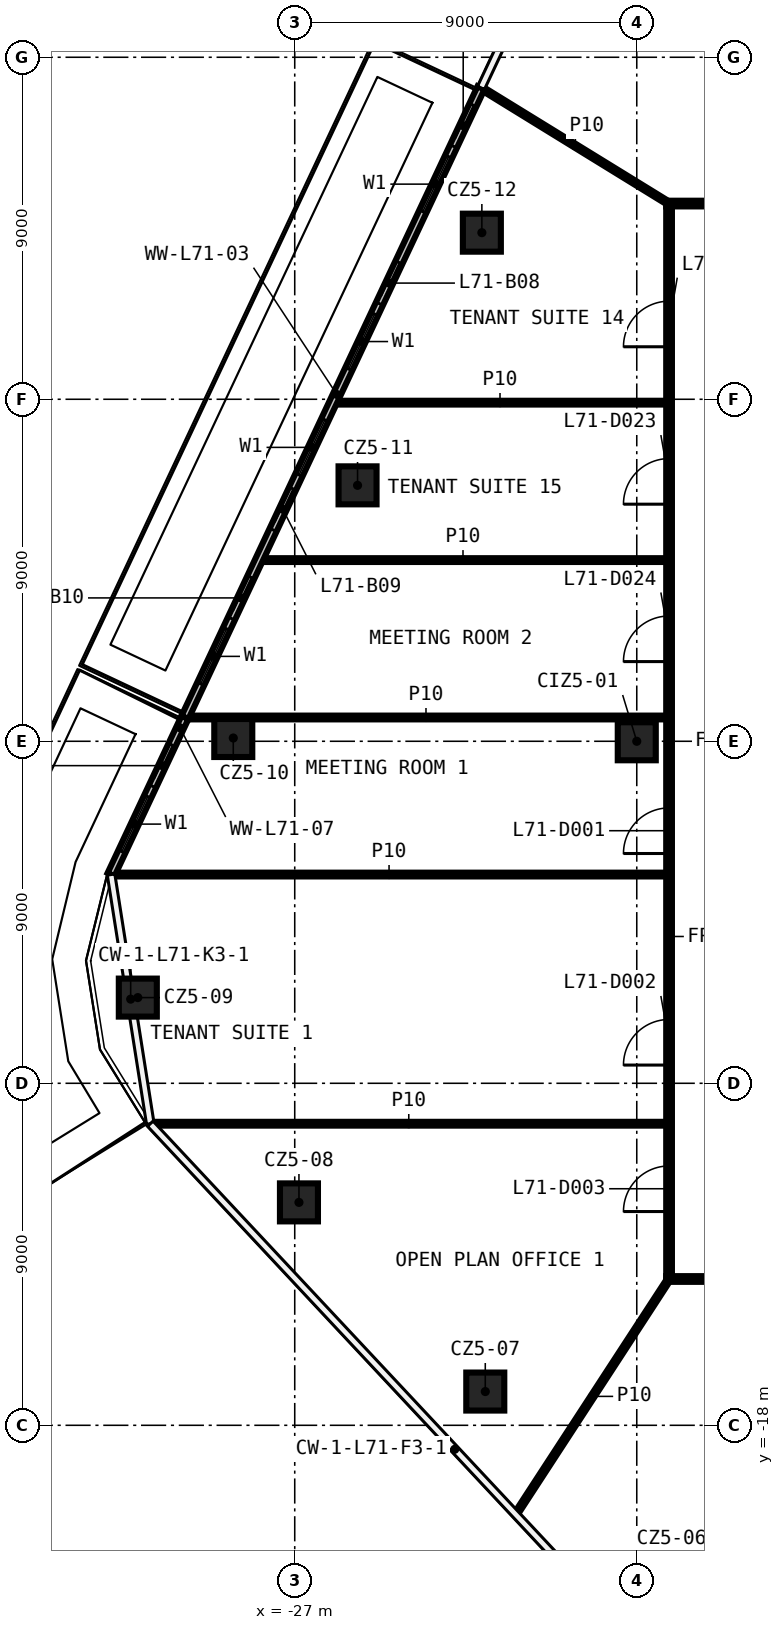
"""IFC4 building model, lengths in metres.
Left out: names, types, materials, properties, quantities, classifications, styles, units other than length and angle.
Written with IfcOpenShell. Run it as: python <this file> out.ifc"""

import sys

from ifc_helpers import new_model, si_unit, direction, frame, frame_2d, origin, origin_2d, place, context, subcontext, project, spatial, rectangle, extrude, element, fill, save


model = new_model("IFC4")
c1 = context("Model", 3, precision=1e-05, world=origin(), true_north=direction((0.0, 1.0)))
c2 = subcontext(c1, "Body", "Model", "MODEL_VIEW")
j1 = project(units=[si_unit("LENGTHUNIT", "METRE"), si_unit("PLANEANGLEUNIT", "RADIAN")], contexts=[c1])
p1 = place(None, origin())
s1 = spatial("IfcSite", under=j1, at=p1, CompositionType="ELEMENT")
p2 = place(p1, origin())
s2 = spatial("IfcBuilding", under=s1, at=p2, CompositionType="ELEMENT")
p3 = place(p2, frame((0.0, 0.0, 332.0)))
s3 = spatial("IfcBuildingStorey", under=s2, at=p3, CompositionType="ELEMENT", Elevation=332.0)
for number, where, z_axis, x_axis in (
    (1, (-21.986, -17.112, 0.0), (0.0, 0.0, 1.0), (1.0, 0.0, 0.0)),
    (2, (-26.889, -12.134, 0.0), (0.0, 0.0, 1.0), (1.0, 0.0, 0.0)),
    (3, (-31.129, -6.745, 0.0), (0.0, 0.0, 1.0), (1.0, 0.0, 0.0)),
    (4, (-28.617, 0.086, 0.0), (0.0, 0.0, 1.0), (1.0, 0.0, 0.0)),
    (5, (-25.347, 6.735, 0.0), (0.0, 0.0, 1.0), (1.0, 0.0, 0.0)),
    (6, (-22.076, 13.384, 0.0), (0.0, 0.0, 1.0), (1.0, 0.0, 0.0)),
    (7, (-18.0, 0.0, 0.0), (0.0, 0.0, 1.0), (1.0, 0.0, 0.0)),
):
    element("IfcColumn", number, at=place(p3, frame(where, z_axis=z_axis, x_axis=x_axis)), inside=s3, PredefinedType="COLUMN", context=c2, shape_type="SweptSolid", body=[
        extrude(rectangle(XDim=1.0, YDim=1.0, at=origin_2d()), origin(), (0.0, 0.0, 1.0), 3.82),
    ])
p4 = place(p3, frame((17.225, -14.15, 0.0), z_axis=(0.0, 0.0, 1.0), x_axis=(-1.0, 0.0, 0.0)))
e8 = element("IfcWall", 8, at=p4, inside=s3, PredefinedType="PARTITIONING", context=c2, shape_type="SweptSolid", body=[
    extrude(rectangle(XDim=34.45, YDim=0.15, at=frame_2d((17.225, 0.0))), origin(), (0.0, 0.0, 1.0), 3.82),
])
p5 = place(p4, frame((24.639, 0.0, 0.0)))
e9 = element("IfcOpeningElement", 9, at=p5, cuts=e8, PredefinedType="OPENING", context=c2, shape_type="SweptSolid", body=[
    extrude(rectangle(XDim=1.2, YDim=2.1, at=frame_2d((0.6, 1.05))), frame((0.0, 0.085, 0.0), z_axis=(0.0, -1.0, 0.0), x_axis=(1.0, 0.0, 0.0)), (0.0, 0.0, 1.0), 0.17),
])
p6 = place(p4, frame((20.005, 0.0, 0.0)))
e10 = element("IfcOpeningElement", 10, at=p6, cuts=e8, PredefinedType="OPENING", context=c2, shape_type="SweptSolid", body=[
    extrude(rectangle(XDim=1.2, YDim=2.1, at=frame_2d((0.6, 1.05))), frame((0.0, 0.085, 0.0), z_axis=(0.0, -1.0, 0.0), x_axis=(1.0, 0.0, 0.0)), (0.0, 0.0, 1.0), 0.17),
])
p7 = place(p4, frame((15.367, 0.0, 0.0)))
e11 = element("IfcOpeningElement", 11, at=p7, cuts=e8, PredefinedType="OPENING", context=c2, shape_type="SweptSolid", body=[
    extrude(rectangle(XDim=1.2, YDim=2.1, at=frame_2d((0.6, 1.05))), frame((0.0, 0.085, 0.0), z_axis=(0.0, -1.0, 0.0), x_axis=(1.0, 0.0, 0.0)), (0.0, 0.0, 1.0), 0.17),
])
p8 = place(p4, frame((10.73, 0.0, 0.0)))
e12 = element("IfcOpeningElement", 12, at=p8, cuts=e8, PredefinedType="OPENING", context=c2, shape_type="SweptSolid", body=[
    extrude(rectangle(XDim=1.2, YDim=2.1, at=frame_2d((0.6, 1.05))), frame((0.0, 0.085, 0.0), z_axis=(0.0, -1.0, 0.0), x_axis=(1.0, 0.0, 0.0)), (0.0, 0.0, 1.0), 0.17),
])
p9 = place(p4, frame((6.097, 0.0, 0.0)))
e13 = element("IfcOpeningElement", 13, at=p9, cuts=e8, PredefinedType="OPENING", context=c2, shape_type="SweptSolid", body=[
    extrude(rectangle(XDim=1.2, YDim=2.1, at=frame_2d((0.6, 1.05))), frame((0.0, 0.085, 0.0), z_axis=(0.0, -1.0, 0.0), x_axis=(1.0, 0.0, 0.0)), (0.0, 0.0, 1.0), 0.17),
])
p10 = place(p4, frame((1.83, 0.0, 0.0)))
e14 = element("IfcOpeningElement", 14, at=p10, cuts=e8, PredefinedType="OPENING", context=c2, shape_type="SweptSolid", body=[
    extrude(rectangle(XDim=1.2, YDim=2.1, at=frame_2d((0.6, 1.05))), frame((0.0, 0.085, 0.0), z_axis=(0.0, -1.0, 0.0), x_axis=(1.0, 0.0, 0.0)), (0.0, 0.0, 1.0), 0.17),
])
p11 = place(p3, frame((-30.773, -10.064, 0.0), z_axis=(0.0, 0.0, 1.0), x_axis=(1.0, 0.0, 0.0)))
e15 = element("IfcWall", 15, at=p11, inside=s3, PredefinedType="PARTITIONING", context=c2, shape_type="SweptSolid", body=[
    extrude(rectangle(XDim=13.548, YDim=0.1, at=frame_2d((6.774, 0.0))), origin(), (0.0, 0.0, 1.0), 3.82),
])
p12 = place(p3, frame((-31.811, -3.507, 0.0), z_axis=(0.0, 0.0, 1.0), x_axis=(1.0, 0.0, 0.0)))
e16 = element("IfcWall", 16, at=p12, inside=s3, PredefinedType="PARTITIONING", context=c2, shape_type="SweptSolid", body=[
    extrude(rectangle(XDim=14.586, YDim=0.1, at=frame_2d((7.293, 0.0))), origin(), (0.0, 0.0, 1.0), 3.82),
])
p13 = place(p3, frame((-29.867, 0.626, 0.0), z_axis=(0.0, 0.0, 1.0), x_axis=(1.0, 0.0, 0.0)))
e17 = element("IfcWall", 17, at=p13, inside=s3, PredefinedType="PARTITIONING", context=c2, shape_type="SweptSolid", body=[
    extrude(rectangle(XDim=12.642, YDim=0.1, at=frame_2d((6.321, 0.0))), origin(), (0.0, 0.0, 1.0), 3.82),
])
p14 = place(p3, frame((-27.92, 4.768, 0.0), z_axis=(0.0, 0.0, 1.0), x_axis=(1.0, 0.0, 0.0)))
e18 = element("IfcWall", 18, at=p14, inside=s3, PredefinedType="PARTITIONING", context=c2, shape_type="SweptSolid", body=[
    extrude(rectangle(XDim=10.695, YDim=0.1, at=frame_2d((5.347, 0.0))), origin(), (0.0, 0.0, 1.0), 3.82),
])
p15 = place(p3, frame((-25.972, 8.911, 0.0), z_axis=(0.0, 0.0, 1.0), x_axis=(1.0, 0.0, 0.0)))
e19 = element("IfcWall", 19, at=p15, inside=s3, PredefinedType="PARTITIONING", context=c2, shape_type="SweptSolid", body=[
    extrude(rectangle(XDim=8.747, YDim=0.1, at=frame_2d((4.374, 0.0))), origin(), (0.0, 0.0, 1.0), 3.82),
])
p16 = place(p3, frame((-17.225, 14.15, 0.0), z_axis=(0.0, 0.0, 1.0), x_axis=(1.0, 0.0, 0.0)))
e20 = element("IfcWall", 20, at=p16, inside=s3, PredefinedType="PARTITIONING", context=c2, shape_type="SweptSolid", body=[
    extrude(rectangle(XDim=34.45, YDim=0.15, at=frame_2d((17.225, 0.0))), origin(), (0.0, 0.0, 1.0), 3.82),
])
p17 = place(p16, frame((24.708, 0.0, 0.0)))
e21 = element("IfcOpeningElement", 21, at=p17, cuts=e20, PredefinedType="OPENING", context=c2, shape_type="SweptSolid", body=[
    extrude(rectangle(XDim=1.2, YDim=2.1, at=frame_2d((0.6, 1.05))), frame((0.0, 0.085, 0.0), z_axis=(0.0, -1.0, 0.0), x_axis=(1.0, 0.0, 0.0)), (0.0, 0.0, 1.0), 0.17),
])
p18 = place(p16, frame((20.038, 0.0, 0.0)))
e22 = element("IfcOpeningElement", 22, at=p18, cuts=e20, PredefinedType="OPENING", context=c2, shape_type="SweptSolid", body=[
    extrude(rectangle(XDim=1.2, YDim=2.1, at=frame_2d((0.6, 1.05))), frame((0.0, 0.085, 0.0), z_axis=(0.0, -1.0, 0.0), x_axis=(1.0, 0.0, 0.0)), (0.0, 0.0, 1.0), 0.17),
])
p19 = place(p16, frame((15.367, 0.0, 0.0)))
e23 = element("IfcOpeningElement", 23, at=p19, cuts=e20, PredefinedType="OPENING", context=c2, shape_type="SweptSolid", body=[
    extrude(rectangle(XDim=1.2, YDim=2.1, at=frame_2d((0.6, 1.05))), frame((0.0, 0.085, 0.0), z_axis=(0.0, -1.0, 0.0), x_axis=(1.0, 0.0, 0.0)), (0.0, 0.0, 1.0), 0.17),
])
p20 = place(p16, frame((10.695, 0.0, 0.0)))
e24 = element("IfcOpeningElement", 24, at=p20, cuts=e20, PredefinedType="OPENING", context=c2, shape_type="SweptSolid", body=[
    extrude(rectangle(XDim=1.2, YDim=2.1, at=frame_2d((0.6, 1.05))), frame((0.0, 0.085, 0.0), z_axis=(0.0, -1.0, 0.0), x_axis=(1.0, 0.0, 0.0)), (0.0, 0.0, 1.0), 0.17),
])
p21 = place(p16, frame((6.025, 0.0, 0.0)))
e25 = element("IfcOpeningElement", 25, at=p21, cuts=e20, PredefinedType="OPENING", context=c2, shape_type="SweptSolid", body=[
    extrude(rectangle(XDim=1.2, YDim=2.1, at=frame_2d((0.6, 1.05))), frame((0.0, 0.085, 0.0), z_axis=(0.0, -1.0, 0.0), x_axis=(1.0, 0.0, 0.0)), (0.0, 0.0, 1.0), 0.17),
])
p22 = place(p16, frame((1.698, 0.0, 0.0)))
e26 = element("IfcOpeningElement", 26, at=p22, cuts=e20, PredefinedType="OPENING", context=c2, shape_type="SweptSolid", body=[
    extrude(rectangle(XDim=1.2, YDim=2.1, at=frame_2d((0.6, 1.05))), frame((0.0, 0.085, 0.0), z_axis=(0.0, -1.0, 0.0), x_axis=(1.0, 0.0, 0.0)), (0.0, 0.0, 1.0), 0.17),
])
p23 = place(p3, frame((-21.176, -20.328, 0.0), z_axis=(0.0, 0.0, 1.0), x_axis=(0.5459597113, 0.837811430834, 0.0)))
e27 = element("IfcWall", 27, at=p23, inside=s3, PredefinedType="PARTITIONING", context=c2, shape_type="SweptSolid", body=[
    extrude(rectangle(XDim=7.374, YDim=0.1, at=frame_2d((3.687, 0.0))), origin(), (0.0, 0.0, 1.0), 3.82),
])
p24 = place(p3, frame((-17.15, -14.075, 0.0), z_axis=(0.0, 0.0, 1.0), x_axis=(0.0, 1.0, 0.0)))
e28 = element("IfcWall", 28, at=p24, inside=s3, PredefinedType="PARTITIONING", context=c2, shape_type="SweptSolid", body=[
    extrude(rectangle(XDim=28.15, YDim=0.15, at=frame_2d((14.075, 0.0))), origin(), (0.0, 0.0, 1.0), 3.82),
])
p25 = place(p24, frame((11.122, 0.0, 0.0)))
e29 = element("IfcOpeningElement", 29, at=p25, cuts=e28, PredefinedType="OPENING", context=c2, shape_type="SweptSolid", body=[
    extrude(rectangle(XDim=1.2, YDim=2.1, at=frame_2d((0.6, 1.05))), frame((0.0, 0.085, 0.0), z_axis=(0.0, -1.0, 0.0), x_axis=(1.0, 0.0, 0.0)), (0.0, 0.0, 1.0), 0.17),
])
p26 = place(p24, frame((5.555, 0.0, 0.0)))
e30 = element("IfcOpeningElement", 30, at=p26, cuts=e28, PredefinedType="OPENING", context=c2, shape_type="SweptSolid", body=[
    extrude(rectangle(XDim=1.2, YDim=2.1, at=frame_2d((0.6, 1.05))), frame((0.0, 0.085, 0.0), z_axis=(0.0, -1.0, 0.0), x_axis=(1.0, 0.0, 0.0)), (0.0, 0.0, 1.0), 0.17),
])
p27 = place(p24, frame((1.7, 0.0, 0.0)))
e31 = element("IfcOpeningElement", 31, at=p27, cuts=e28, PredefinedType="OPENING", context=c2, shape_type="SweptSolid", body=[
    extrude(rectangle(XDim=1.2, YDim=2.1, at=frame_2d((0.6, 1.05))), frame((0.0, 0.085, 0.0), z_axis=(0.0, -1.0, 0.0), x_axis=(1.0, 0.0, 0.0)), (0.0, 0.0, 1.0), 0.17),
])
p28 = place(p24, frame((24.457, 0.0, 0.0)))
e32 = element("IfcOpeningElement", 32, at=p28, cuts=e28, PredefinedType="OPENING", context=c2, shape_type="SweptSolid", body=[
    extrude(rectangle(XDim=1.2, YDim=2.1, at=frame_2d((0.6, 1.05))), frame((0.0, 0.085, 0.0), z_axis=(0.0, -1.0, 0.0), x_axis=(1.0, 0.0, 0.0)), (0.0, 0.0, 1.0), 0.17),
])
p29 = place(p24, frame((20.314, 0.0, 0.0)))
e33 = element("IfcOpeningElement", 33, at=p29, cuts=e28, PredefinedType="OPENING", context=c2, shape_type="SweptSolid", body=[
    extrude(rectangle(XDim=1.2, YDim=2.1, at=frame_2d((0.6, 1.05))), frame((0.0, 0.085, 0.0), z_axis=(0.0, -1.0, 0.0), x_axis=(1.0, 0.0, 0.0)), (0.0, 0.0, 1.0), 0.17),
])
p30 = place(p24, frame((16.172, 0.0, 0.0)))
e34 = element("IfcOpeningElement", 34, at=p30, cuts=e28, PredefinedType="OPENING", context=c2, shape_type="SweptSolid", body=[
    extrude(rectangle(XDim=1.2, YDim=2.1, at=frame_2d((0.6, 1.05))), frame((0.0, 0.085, 0.0), z_axis=(0.0, -1.0, 0.0), x_axis=(1.0, 0.0, 0.0)), (0.0, 0.0, 1.0), 0.17),
])
p31 = place(p3, frame((-22.081, 17.185, 0.0), z_axis=(0.0, 0.0, 1.0), x_axis=(0.85162357217, -0.524153881341, 0.0)))
e35 = element("IfcWall", 35, at=p31, inside=s3, PredefinedType="PARTITIONING", context=c2, shape_type="SweptSolid", body=[
    extrude(rectangle(XDim=5.791, YDim=0.1, at=frame_2d((2.895, 0.0))), origin(), (0.0, 0.0, 1.0), 3.82),
])
p32 = place(p3, frame((-22.099, 17.195, 0.0), z_axis=(0.0, 0.0, 1.0), x_axis=(-0.425492631057, -0.904961889206, 0.0)))
e36 = element("IfcWall", 36, at=p32, inside=s3, PredefinedType="SOLIDWALL", context=c2, shape_type="SweptSolid", body=[
    extrude(rectangle(XDim=18.309, YDim=0.2, at=frame_2d((9.155, 0.0))), origin(), (0.0, 0.0, 1.0), 3.82),
])
p33 = place(p32, frame((2.0, 0.0, 0.6)))
e37 = element("IfcOpeningElement", 37, at=p33, cuts=e36, PredefinedType="OPENING", context=c2, shape_type="SweptSolid", body=[
    extrude(rectangle(XDim=1.6, YDim=2.4, at=frame_2d((0.8, 1.2))), frame((0.0, 0.11, 0.0), z_axis=(0.0, -1.0, 0.0), x_axis=(1.0, 0.0, 0.0)), (0.0, 0.0, 1.0), 0.22),
])
p34 = place(p32, frame((0.5, 0.0, 0.0)))
e38 = element("IfcOpeningElement", 38, at=p34, cuts=e36, PredefinedType="OPENING", context=c2, shape_type="SweptSolid", body=[
    extrude(rectangle(XDim=1.2, YDim=2.4, at=frame_2d((0.6, 1.2))), frame((0.0, 0.11, 0.0), z_axis=(0.0, -1.0, 0.0), x_axis=(1.0, 0.0, 0.0)), (0.0, 0.0, 1.0), 0.22),
])
p35 = place(p32, frame((6.577, 0.0, 0.6)))
e39 = element("IfcOpeningElement", 39, at=p35, cuts=e36, PredefinedType="OPENING", context=c2, shape_type="SweptSolid", body=[
    extrude(rectangle(XDim=1.6, YDim=2.4, at=frame_2d((0.8, 1.2))), frame((0.0, 0.11, 0.0), z_axis=(0.0, -1.0, 0.0), x_axis=(1.0, 0.0, 0.0)), (0.0, 0.0, 1.0), 0.22),
])
p36 = place(p32, frame((5.077, 0.0, 0.0)))
e40 = element("IfcOpeningElement", 40, at=p36, cuts=e36, PredefinedType="OPENING", context=c2, shape_type="SweptSolid", body=[
    extrude(rectangle(XDim=1.2, YDim=2.4, at=frame_2d((0.6, 1.2))), frame((0.0, 0.11, 0.0), z_axis=(0.0, -1.0, 0.0), x_axis=(1.0, 0.0, 0.0)), (0.0, 0.0, 1.0), 0.22),
])
p37 = place(p32, frame((9.655, 0.0, 0.6)))
e41 = element("IfcOpeningElement", 41, at=p37, cuts=e36, PredefinedType="OPENING", context=c2, shape_type="SweptSolid", body=[
    extrude(rectangle(XDim=1.6, YDim=2.4, at=frame_2d((0.8, 1.2))), frame((0.0, 0.11, 0.0), z_axis=(0.0, -1.0, 0.0), x_axis=(1.0, 0.0, 0.0)), (0.0, 0.0, 1.0), 0.22),
])
p38 = place(p32, frame((11.655, 0.0, 0.0)))
e42 = element("IfcOpeningElement", 42, at=p38, cuts=e36, PredefinedType="OPENING", context=c2, shape_type="SweptSolid", body=[
    extrude(rectangle(XDim=1.2, YDim=2.4, at=frame_2d((0.6, 1.2))), frame((0.0, 0.11, 0.0), z_axis=(0.0, -1.0, 0.0), x_axis=(1.0, 0.0, 0.0)), (0.0, 0.0, 1.0), 0.22),
])
p39 = place(p32, frame((15.732, 0.0, 0.6)))
e43 = element("IfcOpeningElement", 43, at=p39, cuts=e36, PredefinedType="OPENING", context=c2, shape_type="SweptSolid", body=[
    extrude(rectangle(XDim=1.6, YDim=2.4, at=frame_2d((0.8, 1.2))), frame((0.0, 0.11, 0.0), z_axis=(0.0, -1.0, 0.0), x_axis=(1.0, 0.0, 0.0)), (0.0, 0.0, 1.0), 0.22),
])
p40 = place(p32, frame((14.232, 0.0, 0.0)))
e44 = element("IfcOpeningElement", 44, at=p40, cuts=e36, PredefinedType="OPENING", context=c2, shape_type="SweptSolid", body=[
    extrude(rectangle(XDim=1.2, YDim=2.4, at=frame_2d((0.6, 1.2))), frame((0.0, 0.11, 0.0), z_axis=(0.0, -1.0, 0.0), x_axis=(1.0, 0.0, 0.0)), (0.0, 0.0, 1.0), 0.22),
])
p41 = place(p3, frame((-29.889, 0.626, 0.0), z_axis=(0.0, 0.0, 1.0), x_axis=(-0.425531877643, -0.904943435309, 0.0)))
e45 = element("IfcWall", 45, at=p41, inside=s3, PredefinedType="SOLIDWALL", context=c2, shape_type="SweptSolid", body=[
    extrude(rectangle(XDim=4.567, YDim=0.2, at=frame_2d((2.284, 0.0))), origin(), (0.0, 0.0, 1.0), 3.82),
])
p42 = place(p41, frame((2.3, 0.0, 0.6)))
e46 = element("IfcOpeningElement", 46, at=p42, cuts=e45, PredefinedType="OPENING", context=c2, shape_type="SweptSolid", body=[
    extrude(rectangle(XDim=1.6, YDim=2.4, at=frame_2d((0.8, 1.2))), frame((0.0, 0.11, 0.0), z_axis=(0.0, -1.0, 0.0), x_axis=(1.0, 0.0, 0.0)), (0.0, 0.0, 1.0), 0.22),
])
p43 = place(p41, frame((0.8, 0.0, 0.0)))
e47 = element("IfcOpeningElement", 47, at=p43, cuts=e45, PredefinedType="OPENING", context=c2, shape_type="SweptSolid", body=[
    extrude(rectangle(XDim=1.2, YDim=2.4, at=frame_2d((0.6, 1.2))), frame((0.0, 0.11, 0.0), z_axis=(0.0, -1.0, 0.0), x_axis=(1.0, 0.0, 0.0)), (0.0, 0.0, 1.0), 0.22),
])
p44 = place(p25, origin())
e48 = element("IfcDoor", 48, at=p44, inside=s3, OperationType="SINGLE_SWING_RIGHT", PredefinedType="DOOR", context=c2, shape_type="SweptSolid", body=[
    extrude(rectangle(XDim=1.2, YDim=2.1, at=frame_2d((0.6, 1.05))), frame((0.0, 0.025, 0.0), z_axis=(0.0, -1.0, 0.0), x_axis=(1.0, 0.0, 0.0)), (0.0, 0.0, 1.0), 0.05),
])
fill(e29, e48)
p45 = place(p26, origin())
e49 = element("IfcDoor", 49, at=p45, inside=s3, OperationType="SINGLE_SWING_LEFT", PredefinedType="DOOR", context=c2, shape_type="SweptSolid", body=[
    extrude(rectangle(XDim=1.2, YDim=2.1, at=frame_2d((0.6, 1.05))), frame((0.0, 0.025, 0.0), z_axis=(0.0, -1.0, 0.0), x_axis=(1.0, 0.0, 0.0)), (0.0, 0.0, 1.0), 0.05),
])
fill(e30, e49)
p46 = place(p27, origin())
e50 = element("IfcDoor", 50, at=p46, inside=s3, OperationType="SINGLE_SWING_RIGHT", PredefinedType="DOOR", context=c2, shape_type="SweptSolid", body=[
    extrude(rectangle(XDim=1.2, YDim=2.1, at=frame_2d((0.6, 1.05))), frame((0.0, 0.025, 0.0), z_axis=(0.0, -1.0, 0.0), x_axis=(1.0, 0.0, 0.0)), (0.0, 0.0, 1.0), 0.05),
])
fill(e31, e50)
p47 = place(p28, origin())
e51 = element("IfcDoor", 51, at=p47, inside=s3, OperationType="SINGLE_SWING_LEFT", PredefinedType="DOOR", context=c2, shape_type="SweptSolid", body=[
    extrude(rectangle(XDim=1.2, YDim=2.1, at=frame_2d((0.6, 1.05))), frame((0.0, 0.025, 0.0), z_axis=(0.0, -1.0, 0.0), x_axis=(1.0, 0.0, 0.0)), (0.0, 0.0, 1.0), 0.05),
])
fill(e32, e51)
p48 = place(p29, origin())
e52 = element("IfcDoor", 52, at=p48, inside=s3, OperationType="SINGLE_SWING_RIGHT", PredefinedType="DOOR", context=c2, shape_type="SweptSolid", body=[
    extrude(rectangle(XDim=1.2, YDim=2.1, at=frame_2d((0.6, 1.05))), frame((0.0, 0.025, 0.0), z_axis=(0.0, -1.0, 0.0), x_axis=(1.0, 0.0, 0.0)), (0.0, 0.0, 1.0), 0.05),
])
fill(e33, e52)
p49 = place(p30, origin())
e53 = element("IfcDoor", 53, at=p49, inside=s3, OperationType="SINGLE_SWING_LEFT", PredefinedType="DOOR", context=c2, shape_type="SweptSolid", body=[
    extrude(rectangle(XDim=1.2, YDim=2.1, at=frame_2d((0.6, 1.05))), frame((0.0, 0.025, 0.0), z_axis=(0.0, -1.0, 0.0), x_axis=(1.0, 0.0, 0.0)), (0.0, 0.0, 1.0), 0.05),
])
fill(e34, e53)
p50 = place(p33, origin())
e54 = element("IfcWindow", 54, at=p50, inside=s3, PartitioningType="SINGLE_PANEL", PredefinedType="WINDOW", context=c2, shape_type="SweptSolid", body=[
    extrude(rectangle(XDim=1.6, YDim=2.4, at=frame_2d((0.8, 1.2))), frame((0.0, 0.03, 0.0), z_axis=(0.0, -1.0, 0.0), x_axis=(1.0, 0.0, 0.0)), (0.0, 0.0, 1.0), 0.06),
])
fill(e37, e54)
p51 = place(p34, origin())
e55 = element("IfcDoor", 55, at=p51, inside=s3, OperationType="SLIDING_TO_LEFT", PredefinedType="DOOR", context=c2, shape_type="SweptSolid", body=[
    extrude(rectangle(XDim=1.2, YDim=2.4, at=frame_2d((0.6, 1.2))), frame((0.0, 0.025, 0.0), z_axis=(0.0, -1.0, 0.0), x_axis=(1.0, 0.0, 0.0)), (0.0, 0.0, 1.0), 0.05),
])
fill(e38, e55)
p52 = place(p35, origin())
e56 = element("IfcWindow", 56, at=p52, inside=s3, PartitioningType="SINGLE_PANEL", PredefinedType="WINDOW", context=c2, shape_type="SweptSolid", body=[
    extrude(rectangle(XDim=1.6, YDim=2.4, at=frame_2d((0.8, 1.2))), frame((0.0, 0.03, 0.0), z_axis=(0.0, -1.0, 0.0), x_axis=(1.0, 0.0, 0.0)), (0.0, 0.0, 1.0), 0.06),
])
fill(e39, e56)
p53 = place(p36, origin())
e57 = element("IfcDoor", 57, at=p53, inside=s3, OperationType="SLIDING_TO_LEFT", PredefinedType="DOOR", context=c2, shape_type="SweptSolid", body=[
    extrude(rectangle(XDim=1.2, YDim=2.4, at=frame_2d((0.6, 1.2))), frame((0.0, 0.025, 0.0), z_axis=(0.0, -1.0, 0.0), x_axis=(1.0, 0.0, 0.0)), (0.0, 0.0, 1.0), 0.05),
])
fill(e40, e57)
p54 = place(p37, origin())
e58 = element("IfcWindow", 58, at=p54, inside=s3, PartitioningType="SINGLE_PANEL", PredefinedType="WINDOW", context=c2, shape_type="SweptSolid", body=[
    extrude(rectangle(XDim=1.6, YDim=2.4, at=frame_2d((0.8, 1.2))), frame((0.0, 0.03, 0.0), z_axis=(0.0, -1.0, 0.0), x_axis=(1.0, 0.0, 0.0)), (0.0, 0.0, 1.0), 0.06),
])
fill(e41, e58)
p55 = place(p38, origin())
e59 = element("IfcDoor", 59, at=p55, inside=s3, OperationType="SLIDING_TO_LEFT", PredefinedType="DOOR", context=c2, shape_type="SweptSolid", body=[
    extrude(rectangle(XDim=1.2, YDim=2.4, at=frame_2d((0.6, 1.2))), frame((0.0, 0.025, 0.0), z_axis=(0.0, -1.0, 0.0), x_axis=(1.0, 0.0, 0.0)), (0.0, 0.0, 1.0), 0.05),
])
fill(e42, e59)
p56 = place(p39, origin())
e60 = element("IfcWindow", 60, at=p56, inside=s3, PartitioningType="SINGLE_PANEL", PredefinedType="WINDOW", context=c2, shape_type="SweptSolid", body=[
    extrude(rectangle(XDim=1.6, YDim=2.4, at=frame_2d((0.8, 1.2))), frame((0.0, 0.03, 0.0), z_axis=(0.0, -1.0, 0.0), x_axis=(1.0, 0.0, 0.0)), (0.0, 0.0, 1.0), 0.06),
])
fill(e43, e60)
p57 = place(p40, origin())
e61 = element("IfcDoor", 61, at=p57, inside=s3, OperationType="SLIDING_TO_LEFT", PredefinedType="DOOR", context=c2, shape_type="SweptSolid", body=[
    extrude(rectangle(XDim=1.2, YDim=2.4, at=frame_2d((0.6, 1.2))), frame((0.0, 0.025, 0.0), z_axis=(0.0, -1.0, 0.0), x_axis=(1.0, 0.0, 0.0)), (0.0, 0.0, 1.0), 0.05),
])
fill(e44, e61)
p58 = place(p42, origin())
e62 = element("IfcWindow", 62, at=p58, inside=s3, PartitioningType="SINGLE_PANEL", PredefinedType="WINDOW", context=c2, shape_type="SweptSolid", body=[
    extrude(rectangle(XDim=1.6, YDim=2.4, at=frame_2d((0.8, 1.2))), frame((0.0, 0.03, 0.0), z_axis=(0.0, -1.0, 0.0), x_axis=(1.0, 0.0, 0.0)), (0.0, 0.0, 1.0), 0.06),
])
fill(e46, e62)
p59 = place(p43, origin())
e63 = element("IfcDoor", 63, at=p59, inside=s3, OperationType="SLIDING_TO_LEFT", PredefinedType="DOOR", context=c2, shape_type="SweptSolid", body=[
    extrude(rectangle(XDim=1.2, YDim=2.4, at=frame_2d((0.6, 1.2))), frame((0.0, 0.025, 0.0), z_axis=(0.0, -1.0, 0.0), x_axis=(1.0, 0.0, 0.0)), (0.0, 0.0, 1.0), 0.05),
])
fill(e47, e63)
save(model, sys.argv[1])
